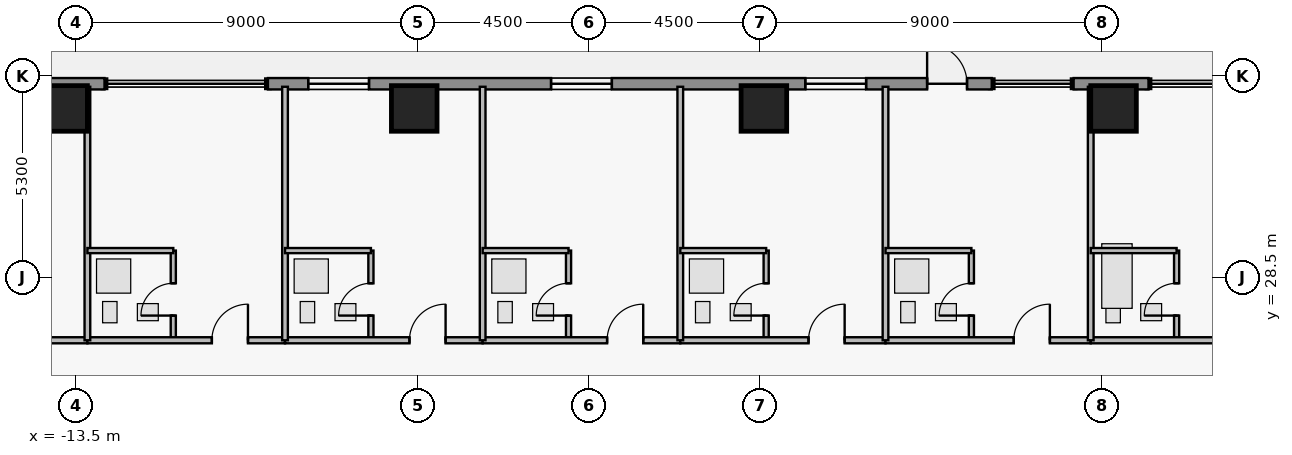
"""IFC4 building model, lengths in metres.
Left out: names, types, materials, properties, quantities, classifications, styles, units other than length and angle.
Written with IfcOpenShell. Run it as: python <this file> out.ifc"""

import sys

from ifc_helpers import new_model, si_unit, direction, frame, frame_2d, origin, origin_2d, place, context, subcontext, project, spatial, rectangle, extrude, element, fill, save


model = new_model("IFC4")
c1 = context("Model", 3, precision=1e-05, world=origin(), true_north=direction((0.0, 1.0)))
c2 = subcontext(c1, "Body", "Model", "MODEL_VIEW")
j1 = project(units=[si_unit("LENGTHUNIT", "METRE"), si_unit("PLANEANGLEUNIT", "RADIAN")], contexts=[c1])
p1 = place(None, origin())
s1 = spatial("IfcSite", under=j1, at=p1, CompositionType="ELEMENT")
p2 = place(p1, origin())
s2 = spatial("IfcBuilding", under=s1, at=p2, CompositionType="ELEMENT")
p3 = place(p2, frame((0.0, 0.0, 203.65)))
s3 = spatial("IfcBuildingStorey", under=s2, at=p3, CompositionType="ELEMENT", Elevation=203.65)
for number, where, z_axis, x_axis in (
    (1, (-13.8, 32.95, 0.0), (0.0, 0.0, 1.0), (1.0, 0.0, 0.0)),
    (2, (-4.6, 32.95, 0.0), (0.0, 0.0, 1.0), (1.0, 0.0, 0.0)),
    (3, (4.6, 32.95, 0.0), (0.0, 0.0, 1.0), (1.0, 0.0, 0.0)),
    (4, (13.8, 32.95, 0.0), (0.0, 0.0, 1.0), (1.0, 0.0, 0.0)),
):
    element("IfcColumn", number, at=place(p3, frame(where, z_axis=z_axis, x_axis=x_axis)), inside=s3, PredefinedType="COLUMN", context=c2, shape_type="SweptSolid", body=[
        extrude(rectangle(XDim=1.2, YDim=1.2, at=origin_2d()), origin(), (0.0, 0.0, 1.0), 3.75),
    ])
p4 = place(p3, frame((-14.72, 33.6, 0.0), z_axis=(0.0, 0.0, 1.0), x_axis=(1.0, 0.0, 0.0)))
e5 = element("IfcWall", 5, at=p4, inside=s3, PredefinedType="STANDARD", context=c2, shape_type="SweptSolid", body=[
    extrude(rectangle(XDim=1.97, YDim=0.3, at=frame_2d((0.985, 0.0))), origin(), (0.0, 0.0, 1.0), 3.53),
])
p5 = place(p3, frame((-8.45, 33.6, 0.0), z_axis=(0.0, 0.0, 1.0), x_axis=(1.0, 0.0, 0.0)))
e6 = element("IfcWall", 6, at=p5, inside=s3, PredefinedType="STANDARD", context=c2, shape_type="SweptSolid", body=[
    extrude(rectangle(XDim=19.045, YDim=0.3, at=frame_2d((9.522, 0.0))), origin(), (0.0, 0.0, 1.0), 3.53),
])
p6 = place(p5, frame((17.345, 0.0, 0.0)))
e7 = element("IfcOpeningElement", 7, at=p6, cuts=e6, PredefinedType="OPENING", context=c2, shape_type="SweptSolid", body=[
    extrude(rectangle(XDim=1.05, YDim=2.2, at=frame_2d((0.525, 1.1))), frame((0.0, 0.16, 0.0), z_axis=(0.0, -1.0, 0.0), x_axis=(1.0, 0.0, 0.0)), (0.0, 0.0, 1.0), 0.32),
])
p7 = place(p5, frame((7.45, 0.0, 0.85)))
e8 = element("IfcOpeningElement", 8, at=p7, cuts=e6, PredefinedType="OPENING", context=c2, shape_type="SweptSolid", body=[
    extrude(rectangle(XDim=1.6, YDim=1.8, at=frame_2d((0.8, 0.9))), frame((0.0, 0.16, 0.0), z_axis=(0.0, -1.0, 0.0), x_axis=(1.0, 0.0, 0.0)), (0.0, 0.0, 1.0), 0.32),
])
p8 = place(p5, frame((1.06, 0.0, 0.85)))
e9 = element("IfcOpeningElement", 9, at=p8, cuts=e6, PredefinedType="OPENING", context=c2, shape_type="SweptSolid", body=[
    extrude(rectangle(XDim=1.6, YDim=1.8, at=frame_2d((0.8, 0.9))), frame((0.0, 0.16, 0.0), z_axis=(0.0, -1.0, 0.0), x_axis=(1.0, 0.0, 0.0)), (0.0, 0.0, 1.0), 0.32),
])
p9 = place(p5, frame((14.14, 0.0, 0.85)))
e10 = element("IfcOpeningElement", 10, at=p9, cuts=e6, PredefinedType="OPENING", context=c2, shape_type="SweptSolid", body=[
    extrude(rectangle(XDim=1.6, YDim=1.8, at=frame_2d((0.8, 0.9))), frame((0.0, 0.16, 0.0), z_axis=(0.0, -1.0, 0.0), x_axis=(1.0, 0.0, 0.0)), (0.0, 0.0, 1.0), 0.32),
])
p10 = place(p3, frame((12.75, 33.6, 0.0), z_axis=(0.0, 0.0, 1.0), x_axis=(1.0, 0.0, 0.0)))
e11 = element("IfcWall", 11, at=p10, inside=s3, PredefinedType="STANDARD", context=c2, shape_type="SweptSolid", body=[
    extrude(rectangle(XDim=1.97, YDim=0.3, at=frame_2d((0.985, 0.0))), origin(), (0.0, 0.0, 1.0), 3.53),
])
p11 = place(p3, frame((-22.04, 26.85, 0.0), z_axis=(0.0, 0.0, 1.0), x_axis=(1.0, 0.0, 0.0)))
e12 = element("IfcWall", 12, at=p11, inside=s3, PredefinedType="PARTITIONING", context=c2, shape_type="SweptSolid", body=[
    extrude(rectangle(XDim=8.84, YDim=0.16, at=frame_2d((4.42, 0.0))), origin(), (0.0, 0.0, 1.0), 3.53),
])
p12 = place(p11, frame((5.07, 0.0, 0.0)))
e13 = element("IfcOpeningElement", 13, at=p12, cuts=e12, PredefinedType="OPENING", context=c2, shape_type="SweptSolid", body=[
    extrude(rectangle(XDim=1.0, YDim=2.15, at=frame_2d((0.5, 1.075))), frame((0.0, 0.09, 0.0), z_axis=(0.0, -1.0, 0.0), x_axis=(1.0, 0.0, 0.0)), (0.0, 0.0, 1.0), 0.18),
])
p13 = place(p3, frame((-10.94, 26.85, 0.0), z_axis=(0.0, 0.0, 1.0), x_axis=(0.0, 1.0, 0.0)))
e14 = element("IfcWall", 14, at=p13, inside=s3, PredefinedType="PLUMBINGWALL", context=c2, shape_type="SweptSolid", body=[
    extrude(rectangle(XDim=2.36, YDim=0.135, at=frame_2d((1.18, 0.0))), origin(), (0.0, 0.0, 1.0), 3.53),
])
p14 = place(p13, frame((0.65, 0.0, 0.0)))
e15 = element("IfcOpeningElement", 15, at=p14, cuts=e14, PredefinedType="OPENING", context=c2, shape_type="SweptSolid", body=[
    extrude(rectangle(XDim=0.85, YDim=2.1, at=frame_2d((0.425, 1.05))), frame((0.0, 0.077, 0.0), z_axis=(0.0, -1.0, 0.0), x_axis=(1.0, 0.0, 0.0)), (0.0, 0.0, 1.0), 0.155),
])
p15 = place(p3, frame((-13.2, 26.85, 0.0), z_axis=(0.0, 0.0, 1.0), x_axis=(1.0, 0.0, 0.0)))
e16 = element("IfcWall", 16, at=p15, inside=s3, PredefinedType="PARTITIONING", context=c2, shape_type="SweptSolid", body=[
    extrude(rectangle(XDim=5.2, YDim=0.16, at=frame_2d((2.6, 0.0))), origin(), (0.0, 0.0, 1.0), 3.53),
])
p16 = place(p15, frame((3.275, 0.0, 0.0)))
e17 = element("IfcOpeningElement", 17, at=p16, cuts=e16, PredefinedType="OPENING", context=c2, shape_type="SweptSolid", body=[
    extrude(rectangle(XDim=0.95, YDim=2.15, at=frame_2d((0.475, 1.075))), frame((0.0, 0.09, 0.0), z_axis=(0.0, -1.0, 0.0), x_axis=(1.0, 0.0, 0.0)), (0.0, 0.0, 1.0), 0.18),
])
p17 = place(p3, frame((-5.74, 26.85, 0.0), z_axis=(0.0, 0.0, 1.0), x_axis=(0.0, 1.0, 0.0)))
e18 = element("IfcWall", 18, at=p17, inside=s3, PredefinedType="PLUMBINGWALL", context=c2, shape_type="SweptSolid", body=[
    extrude(rectangle(XDim=2.36, YDim=0.135, at=frame_2d((1.18, 0.0))), origin(), (0.0, 0.0, 1.0), 3.53),
])
p18 = place(p17, frame((0.65, 0.0, 0.0)))
e19 = element("IfcOpeningElement", 19, at=p18, cuts=e18, PredefinedType="OPENING", context=c2, shape_type="SweptSolid", body=[
    extrude(rectangle(XDim=0.85, YDim=2.1, at=frame_2d((0.425, 1.05))), frame((0.0, 0.077, 0.0), z_axis=(0.0, -1.0, 0.0), x_axis=(1.0, 0.0, 0.0)), (0.0, 0.0, 1.0), 0.155),
])
p19 = place(p3, frame((-8.0, 26.85, 0.0), z_axis=(0.0, 0.0, 1.0), x_axis=(1.0, 0.0, 0.0)))
e20 = element("IfcWall", 20, at=p19, inside=s3, PredefinedType="PARTITIONING", context=c2, shape_type="SweptSolid", body=[
    extrude(rectangle(XDim=5.2, YDim=0.16, at=frame_2d((2.6, 0.0))), origin(), (0.0, 0.0, 1.0), 3.53),
])
p20 = place(p19, frame((3.275, 0.0, 0.0)))
e21 = element("IfcOpeningElement", 21, at=p20, cuts=e20, PredefinedType="OPENING", context=c2, shape_type="SweptSolid", body=[
    extrude(rectangle(XDim=0.95, YDim=2.15, at=frame_2d((0.475, 1.075))), frame((0.0, 0.09, 0.0), z_axis=(0.0, -1.0, 0.0), x_axis=(1.0, 0.0, 0.0)), (0.0, 0.0, 1.0), 0.18),
])
p21 = place(p3, frame((-0.54, 26.85, 0.0), z_axis=(0.0, 0.0, 1.0), x_axis=(0.0, 1.0, 0.0)))
e22 = element("IfcWall", 22, at=p21, inside=s3, PredefinedType="PLUMBINGWALL", context=c2, shape_type="SweptSolid", body=[
    extrude(rectangle(XDim=2.36, YDim=0.135, at=frame_2d((1.18, 0.0))), origin(), (0.0, 0.0, 1.0), 3.53),
])
p22 = place(p21, frame((0.65, 0.0, 0.0)))
e23 = element("IfcOpeningElement", 23, at=p22, cuts=e22, PredefinedType="OPENING", context=c2, shape_type="SweptSolid", body=[
    extrude(rectangle(XDim=0.85, YDim=2.1, at=frame_2d((0.425, 1.05))), frame((0.0, 0.077, 0.0), z_axis=(0.0, -1.0, 0.0), x_axis=(1.0, 0.0, 0.0)), (0.0, 0.0, 1.0), 0.155),
])
p23 = place(p3, frame((-2.8, 26.85, 0.0), z_axis=(0.0, 0.0, 1.0), x_axis=(1.0, 0.0, 0.0)))
e24 = element("IfcWall", 24, at=p23, inside=s3, PredefinedType="PARTITIONING", context=c2, shape_type="SweptSolid", body=[
    extrude(rectangle(XDim=5.2, YDim=0.16, at=frame_2d((2.6, 0.0))), origin(), (0.0, 0.0, 1.0), 3.53),
])
p24 = place(p23, frame((3.275, 0.0, 0.0)))
e25 = element("IfcOpeningElement", 25, at=p24, cuts=e24, PredefinedType="OPENING", context=c2, shape_type="SweptSolid", body=[
    extrude(rectangle(XDim=0.95, YDim=2.15, at=frame_2d((0.475, 1.075))), frame((0.0, 0.09, 0.0), z_axis=(0.0, -1.0, 0.0), x_axis=(1.0, 0.0, 0.0)), (0.0, 0.0, 1.0), 0.18),
])
p25 = place(p3, frame((4.66, 26.85, 0.0), z_axis=(0.0, 0.0, 1.0), x_axis=(0.0, 1.0, 0.0)))
e26 = element("IfcWall", 26, at=p25, inside=s3, PredefinedType="PLUMBINGWALL", context=c2, shape_type="SweptSolid", body=[
    extrude(rectangle(XDim=2.36, YDim=0.135, at=frame_2d((1.18, 0.0))), origin(), (0.0, 0.0, 1.0), 2.519),
])
p26 = place(p25, frame((0.65, 0.0, 0.0)))
e27 = element("IfcOpeningElement", 27, at=p26, cuts=e26, PredefinedType="OPENING", context=c2, shape_type="SweptSolid", body=[
    extrude(rectangle(XDim=0.85, YDim=2.1, at=frame_2d((0.425, 1.05))), frame((0.0, 0.077, 0.0), z_axis=(0.0, -1.0, 0.0), x_axis=(1.0, 0.0, 0.0)), (0.0, 0.0, 1.0), 0.155),
])
p27 = place(p3, frame((2.4, 26.85, 0.0), z_axis=(0.0, 0.0, 1.0), x_axis=(1.0, 0.0, 0.0)))
e28 = element("IfcWall", 28, at=p27, inside=s3, PredefinedType="PARTITIONING", context=c2, shape_type="SweptSolid", body=[
    extrude(rectangle(XDim=5.4, YDim=0.16, at=frame_2d((2.7, 0.0))), origin(), (0.0, 0.0, 1.0), 3.53),
])
p28 = place(p27, frame((3.375, 0.0, 0.0)))
e29 = element("IfcOpeningElement", 29, at=p28, cuts=e28, PredefinedType="OPENING", context=c2, shape_type="SweptSolid", body=[
    extrude(rectangle(XDim=0.95, YDim=2.15, at=frame_2d((0.475, 1.075))), frame((0.0, 0.09, 0.0), z_axis=(0.0, -1.0, 0.0), x_axis=(1.0, 0.0, 0.0)), (0.0, 0.0, 1.0), 0.18),
])
p29 = place(p3, frame((10.06, 26.85, 0.0), z_axis=(0.0, 0.0, 1.0), x_axis=(0.0, 1.0, 0.0)))
e30 = element("IfcWall", 30, at=p29, inside=s3, PredefinedType="PLUMBINGWALL", context=c2, shape_type="SweptSolid", body=[
    extrude(rectangle(XDim=2.36, YDim=0.135, at=frame_2d((1.18, 0.0))), origin(), (0.0, 0.0, 1.0), 3.53),
])
p30 = place(p29, frame((0.65, 0.0, 0.0)))
e31 = element("IfcOpeningElement", 31, at=p30, cuts=e30, PredefinedType="OPENING", context=c2, shape_type="SweptSolid", body=[
    extrude(rectangle(XDim=0.85, YDim=2.1, at=frame_2d((0.425, 1.05))), frame((0.0, 0.077, 0.0), z_axis=(0.0, -1.0, 0.0), x_axis=(1.0, 0.0, 0.0)), (0.0, 0.0, 1.0), 0.155),
])
p31 = place(p3, frame((7.8, 26.85, 0.0), z_axis=(0.0, 0.0, 1.0), x_axis=(1.0, 0.0, 0.0)))
e32 = element("IfcWall", 32, at=p31, inside=s3, PredefinedType="PARTITIONING", context=c2, shape_type="SweptSolid", body=[
    extrude(rectangle(XDim=5.4, YDim=0.16, at=frame_2d((2.7, 0.0))), origin(), (0.0, 0.0, 1.0), 3.53),
])
p32 = place(p31, frame((3.375, 0.0, 0.0)))
e33 = element("IfcOpeningElement", 33, at=p32, cuts=e32, PredefinedType="OPENING", context=c2, shape_type="SweptSolid", body=[
    extrude(rectangle(XDim=0.95, YDim=2.15, at=frame_2d((0.475, 1.075))), frame((0.0, 0.09, 0.0), z_axis=(0.0, -1.0, 0.0), x_axis=(1.0, 0.0, 0.0)), (0.0, 0.0, 1.0), 0.18),
])
p33 = place(p3, frame((15.46, 26.85, 0.0), z_axis=(0.0, 0.0, 1.0), x_axis=(0.0, 1.0, 0.0)))
e34 = element("IfcWall", 34, at=p33, inside=s3, PredefinedType="PLUMBINGWALL", context=c2, shape_type="SweptSolid", body=[
    extrude(rectangle(XDim=2.36, YDim=0.135, at=frame_2d((1.18, 0.0))), origin(), (0.0, 0.0, 1.0), 3.53),
])
p34 = place(p33, frame((0.65, 0.0, 0.0)))
e35 = element("IfcOpeningElement", 35, at=p34, cuts=e34, PredefinedType="OPENING", context=c2, shape_type="SweptSolid", body=[
    extrude(rectangle(XDim=0.85, YDim=2.1, at=frame_2d((0.425, 1.05))), frame((0.0, 0.077, 0.0), z_axis=(0.0, -1.0, 0.0), x_axis=(1.0, 0.0, 0.0)), (0.0, 0.0, 1.0), 0.155),
])
p35 = place(p3, frame((13.2, 26.85, 0.0), z_axis=(0.0, 0.0, 1.0), x_axis=(1.0, 0.0, 0.0)))
e36 = element("IfcWall", 36, at=p35, inside=s3, PredefinedType="PARTITIONING", context=c2, shape_type="SweptSolid", body=[
    extrude(rectangle(XDim=8.84, YDim=0.16, at=frame_2d((4.42, 0.0))), origin(), (0.0, 0.0, 1.0), 3.53),
])
p36 = place(p35, frame((5.07, 0.0, 0.0)))
e37 = element("IfcOpeningElement", 37, at=p36, cuts=e36, PredefinedType="OPENING", context=c2, shape_type="SweptSolid", body=[
    extrude(rectangle(XDim=1.0, YDim=2.15, at=frame_2d((0.5, 1.075))), frame((0.0, 0.09, 0.0), z_axis=(0.0, -1.0, 0.0), x_axis=(1.0, 0.0, 0.0)), (0.0, 0.0, 1.0), 0.18),
])
p37 = place(p3, frame((-13.2, 26.85, 0.0), z_axis=(0.0, 0.0, 1.0), x_axis=(0.0, 1.0, 0.0)))
e38 = element("IfcWall", 38, at=p37, inside=s3, PredefinedType="PARTITIONING", context=c2, shape_type="SweptSolid", body=[
    extrude(rectangle(XDim=6.67, YDim=0.15, at=frame_2d((3.335, 0.0))), origin(), (0.0, 0.0, 1.0), 3.53),
])
p38 = place(p3, frame((-13.2, 29.21, 0.0), z_axis=(0.0, 0.0, 1.0), x_axis=(1.0, 0.0, 0.0)))
e39 = element("IfcWall", 39, at=p38, inside=s3, PredefinedType="PLUMBINGWALL", context=c2, shape_type="SweptSolid", body=[
    extrude(rectangle(XDim=2.26, YDim=0.135, at=frame_2d((1.13, 0.0))), origin(), (0.0, 0.0, 1.0), 3.53),
])
p39 = place(p3, frame((-8.0, 26.85, 0.0), z_axis=(0.0, 0.0, 1.0), x_axis=(0.0, 1.0, 0.0)))
e40 = element("IfcWall", 40, at=p39, inside=s3, PredefinedType="PARTITIONING", context=c2, shape_type="SweptSolid", body=[
    extrude(rectangle(XDim=6.67, YDim=0.15, at=frame_2d((3.335, 0.0))), origin(), (0.0, 0.0, 1.0), 3.53),
])
p40 = place(p3, frame((-8.0, 29.21, 0.0), z_axis=(0.0, 0.0, 1.0), x_axis=(1.0, 0.0, 0.0)))
e41 = element("IfcWall", 41, at=p40, inside=s3, PredefinedType="PLUMBINGWALL", context=c2, shape_type="SweptSolid", body=[
    extrude(rectangle(XDim=2.26, YDim=0.135, at=frame_2d((1.13, 0.0))), origin(), (0.0, 0.0, 1.0), 3.53),
])
p41 = place(p3, frame((-2.8, 26.85, 0.0), z_axis=(0.0, 0.0, 1.0), x_axis=(0.0, 1.0, 0.0)))
e42 = element("IfcWall", 42, at=p41, inside=s3, PredefinedType="PARTITIONING", context=c2, shape_type="SweptSolid", body=[
    extrude(rectangle(XDim=6.67, YDim=0.15, at=frame_2d((3.335, 0.0))), origin(), (0.0, 0.0, 1.0), 3.53),
])
p42 = place(p3, frame((-2.8, 29.21, 0.0), z_axis=(0.0, 0.0, 1.0), x_axis=(1.0, 0.0, 0.0)))
e43 = element("IfcWall", 43, at=p42, inside=s3, PredefinedType="PLUMBINGWALL", context=c2, shape_type="SweptSolid", body=[
    extrude(rectangle(XDim=2.26, YDim=0.135, at=frame_2d((1.13, 0.0))), origin(), (0.0, 0.0, 1.0), 3.53),
])
p43 = place(p3, frame((2.4, 26.85, 0.0), z_axis=(0.0, 0.0, 1.0), x_axis=(0.0, 1.0, 0.0)))
e44 = element("IfcWall", 44, at=p43, inside=s3, PredefinedType="PARTITIONING", context=c2, shape_type="SweptSolid", body=[
    extrude(rectangle(XDim=6.67, YDim=0.15, at=frame_2d((3.335, 0.0))), origin(), (0.0, 0.0, 1.0), 3.53),
])
p44 = place(p3, frame((2.4, 29.21, 0.0), z_axis=(0.0, 0.0, 1.0), x_axis=(1.0, 0.0, 0.0)))
e45 = element("IfcWall", 45, at=p44, inside=s3, PredefinedType="PLUMBINGWALL", context=c2, shape_type="SweptSolid", body=[
    extrude(rectangle(XDim=2.26, YDim=0.135, at=frame_2d((1.13, 0.0))), origin(), (0.0, 0.0, 1.0), 3.53),
])
p45 = place(p3, frame((7.8, 26.85, 0.0), z_axis=(0.0, 0.0, 1.0), x_axis=(0.0, 1.0, 0.0)))
e46 = element("IfcWall", 46, at=p45, inside=s3, PredefinedType="PARTITIONING", context=c2, shape_type="SweptSolid", body=[
    extrude(rectangle(XDim=6.67, YDim=0.15, at=frame_2d((3.335, 0.0))), origin(), (0.0, 0.0, 1.0), 3.53),
])
p46 = place(p3, frame((7.8, 29.21, 0.0), z_axis=(0.0, 0.0, 1.0), x_axis=(1.0, 0.0, 0.0)))
e47 = element("IfcWall", 47, at=p46, inside=s3, PredefinedType="PLUMBINGWALL", context=c2, shape_type="SweptSolid", body=[
    extrude(rectangle(XDim=2.26, YDim=0.135, at=frame_2d((1.13, 0.0))), origin(), (0.0, 0.0, 1.0), 3.53),
])
p47 = place(p3, frame((13.2, 26.85, 0.0), z_axis=(0.0, 0.0, 1.0), x_axis=(0.0, 1.0, 0.0)))
e48 = element("IfcWall", 48, at=p47, inside=s3, PredefinedType="PARTITIONING", context=c2, shape_type="SweptSolid", body=[
    extrude(rectangle(XDim=6.67, YDim=0.15, at=frame_2d((3.335, 0.0))), origin(), (0.0, 0.0, 1.0), 3.53),
])
p48 = place(p3, frame((13.2, 29.21, 0.0), z_axis=(0.0, 0.0, 1.0), x_axis=(1.0, 0.0, 0.0)))
e49 = element("IfcWall", 49, at=p48, inside=s3, PredefinedType="PLUMBINGWALL", context=c2, shape_type="SweptSolid", body=[
    extrude(rectangle(XDim=2.26, YDim=0.135, at=frame_2d((1.13, 0.0))), origin(), (0.0, 0.0, 1.0), 3.53),
])
p49 = place(p6, origin())
e50 = element("IfcDoor", 50, at=p49, inside=s3, OperationType="SINGLE_SWING_LEFT", PredefinedType="DOOR", context=c2, shape_type="SweptSolid", body=[
    extrude(rectangle(XDim=1.05, YDim=2.2, at=frame_2d((0.525, 1.1))), frame((0.0, 0.025, 0.0), z_axis=(0.0, -1.0, 0.0), x_axis=(1.0, 0.0, 0.0)), (0.0, 0.0, 1.0), 0.05),
])
fill(e7, e50)
p50 = place(p7, origin())
e51 = element("IfcWindow", 51, at=p50, inside=s3, PartitioningType="SINGLE_PANEL", PredefinedType="WINDOW", context=c2, shape_type="SweptSolid", body=[
    extrude(rectangle(XDim=1.6, YDim=1.8, at=frame_2d((0.8, 0.9))), frame((0.0, 0.03, 0.0), z_axis=(0.0, -1.0, 0.0), x_axis=(1.0, 0.0, 0.0)), (0.0, 0.0, 1.0), 0.06),
])
fill(e8, e51)
p51 = place(p8, origin())
e52 = element("IfcWindow", 52, at=p51, inside=s3, PartitioningType="SINGLE_PANEL", PredefinedType="WINDOW", context=c2, shape_type="SweptSolid", body=[
    extrude(rectangle(XDim=1.6, YDim=1.8, at=frame_2d((0.8, 0.9))), frame((0.0, 0.03, 0.0), z_axis=(0.0, -1.0, 0.0), x_axis=(1.0, 0.0, 0.0)), (0.0, 0.0, 1.0), 0.06),
])
fill(e9, e52)
p52 = place(p9, origin())
e53 = element("IfcWindow", 53, at=p52, inside=s3, PartitioningType="SINGLE_PANEL", PredefinedType="WINDOW", context=c2, shape_type="SweptSolid", body=[
    extrude(rectangle(XDim=1.6, YDim=1.8, at=frame_2d((0.8, 0.9))), frame((0.0, 0.03, 0.0), z_axis=(0.0, -1.0, 0.0), x_axis=(1.0, 0.0, 0.0)), (0.0, 0.0, 1.0), 0.06),
])
fill(e10, e53)
p53 = place(p14, origin())
e54 = element("IfcDoor", 54, at=p53, inside=s3, OperationType="SINGLE_SWING_LEFT", PredefinedType="DOOR", context=c2, shape_type="SweptSolid", body=[
    extrude(rectangle(XDim=0.85, YDim=2.1, at=frame_2d((0.425, 1.05))), frame((0.0, 0.025, 0.0), z_axis=(0.0, -1.0, 0.0), x_axis=(1.0, 0.0, 0.0)), (0.0, 0.0, 1.0), 0.05),
])
fill(e15, e54)
p54 = place(p16, origin())
e55 = element("IfcDoor", 55, at=p54, inside=s3, OperationType="SINGLE_SWING_RIGHT", PredefinedType="DOOR", context=c2, shape_type="SweptSolid", body=[
    extrude(rectangle(XDim=0.95, YDim=2.15, at=frame_2d((0.475, 1.075))), frame((0.0, 0.025, 0.0), z_axis=(0.0, -1.0, 0.0), x_axis=(1.0, 0.0, 0.0)), (0.0, 0.0, 1.0), 0.05),
])
fill(e17, e55)
p55 = place(p18, origin())
e56 = element("IfcDoor", 56, at=p55, inside=s3, OperationType="SINGLE_SWING_LEFT", PredefinedType="DOOR", context=c2, shape_type="SweptSolid", body=[
    extrude(rectangle(XDim=0.85, YDim=2.1, at=frame_2d((0.425, 1.05))), frame((0.0, 0.025, 0.0), z_axis=(0.0, -1.0, 0.0), x_axis=(1.0, 0.0, 0.0)), (0.0, 0.0, 1.0), 0.05),
])
fill(e19, e56)
p56 = place(p20, origin())
e57 = element("IfcDoor", 57, at=p56, inside=s3, OperationType="SINGLE_SWING_RIGHT", PredefinedType="DOOR", context=c2, shape_type="SweptSolid", body=[
    extrude(rectangle(XDim=0.95, YDim=2.15, at=frame_2d((0.475, 1.075))), frame((0.0, 0.025, 0.0), z_axis=(0.0, -1.0, 0.0), x_axis=(1.0, 0.0, 0.0)), (0.0, 0.0, 1.0), 0.05),
])
fill(e21, e57)
p57 = place(p22, origin())
e58 = element("IfcDoor", 58, at=p57, inside=s3, OperationType="SINGLE_SWING_LEFT", PredefinedType="DOOR", context=c2, shape_type="SweptSolid", body=[
    extrude(rectangle(XDim=0.85, YDim=2.1, at=frame_2d((0.425, 1.05))), frame((0.0, 0.025, 0.0), z_axis=(0.0, -1.0, 0.0), x_axis=(1.0, 0.0, 0.0)), (0.0, 0.0, 1.0), 0.05),
])
fill(e23, e58)
p58 = place(p24, origin())
e59 = element("IfcDoor", 59, at=p58, inside=s3, OperationType="SINGLE_SWING_RIGHT", PredefinedType="DOOR", context=c2, shape_type="SweptSolid", body=[
    extrude(rectangle(XDim=0.95, YDim=2.15, at=frame_2d((0.475, 1.075))), frame((0.0, 0.025, 0.0), z_axis=(0.0, -1.0, 0.0), x_axis=(1.0, 0.0, 0.0)), (0.0, 0.0, 1.0), 0.05),
])
fill(e25, e59)
p59 = place(p26, origin())
e60 = element("IfcDoor", 60, at=p59, inside=s3, OperationType="SINGLE_SWING_LEFT", PredefinedType="DOOR", context=c2, shape_type="SweptSolid", body=[
    extrude(rectangle(XDim=0.85, YDim=2.1, at=frame_2d((0.425, 1.05))), frame((0.0, 0.025, 0.0), z_axis=(0.0, -1.0, 0.0), x_axis=(1.0, 0.0, 0.0)), (0.0, 0.0, 1.0), 0.05),
])
fill(e27, e60)
p60 = place(p28, origin())
e61 = element("IfcDoor", 61, at=p60, inside=s3, OperationType="SINGLE_SWING_RIGHT", PredefinedType="DOOR", context=c2, shape_type="SweptSolid", body=[
    extrude(rectangle(XDim=0.95, YDim=2.15, at=frame_2d((0.475, 1.075))), frame((0.0, 0.025, 0.0), z_axis=(0.0, -1.0, 0.0), x_axis=(1.0, 0.0, 0.0)), (0.0, 0.0, 1.0), 0.05),
])
fill(e29, e61)
p61 = place(p30, origin())
e62 = element("IfcDoor", 62, at=p61, inside=s3, OperationType="SINGLE_SWING_LEFT", PredefinedType="DOOR", context=c2, shape_type="SweptSolid", body=[
    extrude(rectangle(XDim=0.85, YDim=2.1, at=frame_2d((0.425, 1.05))), frame((0.0, 0.025, 0.0), z_axis=(0.0, -1.0, 0.0), x_axis=(1.0, 0.0, 0.0)), (0.0, 0.0, 1.0), 0.05),
])
fill(e31, e62)
p62 = place(p32, origin())
e63 = element("IfcDoor", 63, at=p62, inside=s3, OperationType="SINGLE_SWING_RIGHT", PredefinedType="DOOR", context=c2, shape_type="SweptSolid", body=[
    extrude(rectangle(XDim=0.95, YDim=2.15, at=frame_2d((0.475, 1.075))), frame((0.0, 0.025, 0.0), z_axis=(0.0, -1.0, 0.0), x_axis=(1.0, 0.0, 0.0)), (0.0, 0.0, 1.0), 0.05),
])
fill(e33, e63)
p63 = place(p34, origin())
e64 = element("IfcDoor", 64, at=p63, inside=s3, OperationType="SINGLE_SWING_LEFT", PredefinedType="DOOR", context=c2, shape_type="SweptSolid", body=[
    extrude(rectangle(XDim=0.85, YDim=2.1, at=frame_2d((0.425, 1.05))), frame((0.0, 0.025, 0.0), z_axis=(0.0, -1.0, 0.0), x_axis=(1.0, 0.0, 0.0)), (0.0, 0.0, 1.0), 0.05),
])
fill(e35, e64)
save(model, sys.argv[1])
